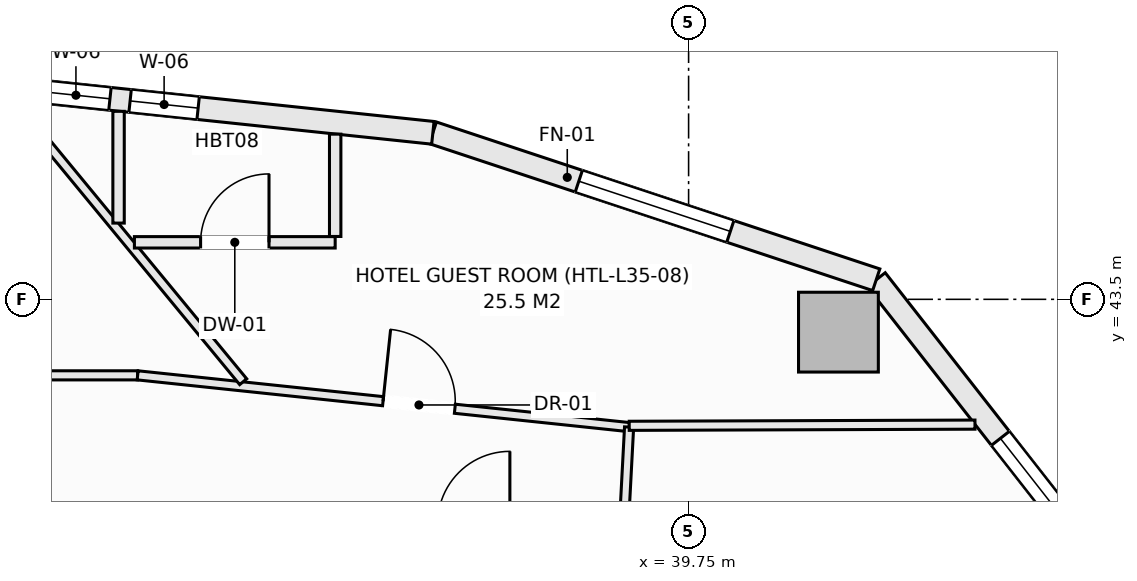
"""IFC4 building model, lengths in metres.
Left out: names, types, materials, properties, quantities, classifications, styles, units other than length and angle.
Written with IfcOpenShell. Run it as: python <this file> out.ifc"""

import sys

from ifc_helpers import new_model, si_unit, direction, frame, frame_2d, origin, origin_2d, place, context, subcontext, project, spatial, rectangle, extrude, element, fill, save


model = new_model("IFC4")
c1 = context("Model", 3, precision=1e-05, world=origin(), true_north=direction((0.0, 1.0)))
c2 = subcontext(c1, "Body", "Model", "MODEL_VIEW")
j1 = project(units=[si_unit("LENGTHUNIT", "METRE"), si_unit("PLANEANGLEUNIT", "RADIAN")], contexts=[c1])
p1 = place(None, origin())
s1 = spatial("IfcSite", under=j1, at=p1, CompositionType="ELEMENT")
p2 = place(p1, origin())
s2 = spatial("IfcBuilding", under=s1, at=p2, CompositionType="ELEMENT")
p3 = place(p2, frame((0.0, 0.0, 139.3)))
s3 = spatial("IfcBuildingStorey", under=s2, at=p3, CompositionType="ELEMENT", Elevation=139.3)
p4 = place(p3, frame((41.721, 43.068, -0.27), z_axis=(0.0, 0.0, 1.0), x_axis=(1.0, 0.0, 0.0)))
e1 = element("IfcColumn", 1, at=p4, inside=s3, PredefinedType="COLUMN", context=c2, shape_type="SweptSolid", body=[
    extrude(rectangle(XDim=1.05, YDim=1.05, at=origin_2d()), origin(), (0.0, 0.0, 1.0), 3.4),
])
p5 = place(p3, frame((42.219, 43.758, 0.0), z_axis=(0.0, 0.0, 1.0), x_axis=(0.616435134162, -0.787405693001, 0.0)))
e2 = element("IfcWall", 2, at=p5, inside=s3, PredefinedType="SOLIDWALL", context=c2, shape_type="SweptSolid", body=[
    extrude(rectangle(XDim=5.759, YDim=0.3, at=frame_2d((2.879, 0.0))), origin(), (0.0, 0.0, 1.0), 2.653),
])
p6 = place(p5, frame((2.65, 0.0, 0.74)))
e3 = element("IfcOpeningElement", 3, at=p6, cuts=e2, PredefinedType="OPENING", context=c2, shape_type="SweptSolid", body=[
    extrude(rectangle(XDim=2.1, YDim=1.7, at=frame_2d((1.05, 0.85))), frame((0.0, 0.16, 0.0), z_axis=(0.0, -1.0, 0.0), x_axis=(1.0, 0.0, 0.0)), (0.0, 0.0, 1.0), 0.32),
])
p7 = place(p3, frame((36.385, 45.691, 0.0), z_axis=(0.0, 0.0, 1.0), x_axis=(0.949238009374, -0.314558741032, 0.0)))
e4 = element("IfcWall", 4, at=p7, inside=s3, PredefinedType="SOLIDWALL", context=c2, shape_type="SweptSolid", body=[
    extrude(rectangle(XDim=6.146, YDim=0.3, at=frame_2d((3.073, 0.0))), origin(), (0.0, 0.0, 1.0), 2.653),
])
p8 = place(p7, frame((2.023, 0.0, 0.74)))
e5 = element("IfcOpeningElement", 5, at=p8, cuts=e4, PredefinedType="OPENING", context=c2, shape_type="SweptSolid", body=[
    extrude(rectangle(XDim=2.1, YDim=1.7, at=frame_2d((1.05, 0.85))), frame((0.0, 0.16, 0.0), z_axis=(0.0, -1.0, 0.0), x_axis=(1.0, 0.0, 0.0)), (0.0, 0.0, 1.0), 0.32),
])
p9 = place(p3, frame((30.125, 46.35, 0.0), z_axis=(0.0, 0.0, 1.0), x_axis=(0.994498012394, -0.104755445421, 0.0)))
e6 = element("IfcWall", 6, at=p9, inside=s3, PredefinedType="SOLIDWALL", context=c2, shape_type="SweptSolid", body=[
    extrude(rectangle(XDim=6.295, YDim=0.3, at=frame_2d((3.147, 0.0))), origin(), (0.0, 0.0, 1.0), 2.653),
])
p10 = place(p9, frame((1.123, 0.0, 0.74)))
e7 = element("IfcOpeningElement", 7, at=p10, cuts=e6, PredefinedType="OPENING", context=c2, shape_type="SweptSolid", body=[
    extrude(rectangle(XDim=0.9, YDim=1.7, at=frame_2d((0.45, 0.85))), frame((0.0, 0.16, 0.0), z_axis=(0.0, -1.0, 0.0), x_axis=(1.0, 0.0, 0.0)), (0.0, 0.0, 1.0), 0.32),
])
p11 = place(p9, frame((2.289, 0.0, 0.74)))
e8 = element("IfcOpeningElement", 8, at=p11, cuts=e6, PredefinedType="OPENING", context=c2, shape_type="SweptSolid", body=[
    extrude(rectangle(XDim=0.9, YDim=1.7, at=frame_2d((0.45, 0.85))), frame((0.0, 0.16, 0.0), z_axis=(0.0, -1.0, 0.0), x_axis=(1.0, 0.0, 0.0)), (0.0, 0.0, 1.0), 0.32),
])
p12 = place(p3, frame((27.749, 42.5, 0.0), z_axis=(0.0, 0.0, 1.0), x_axis=(1.0, 0.0, 0.0)))
e9 = element("IfcWall", 9, at=p12, inside=s3, PredefinedType="PARTITIONING", context=c2, shape_type="SweptSolid", body=[
    extrude(rectangle(XDim=4.752, YDim=0.12, at=frame_2d((2.376, 0.0))), origin(), (0.0, 0.0, 1.0), 3.13),
])
p13 = place(p3, frame((32.501, 42.5, 0.0), z_axis=(0.0, 0.0, 1.0), x_axis=(0.994501131299, -0.104725831799, 0.0)))
e10 = element("IfcWall", 10, at=p13, inside=s3, PredefinedType="PARTITIONING", context=c2, shape_type="SweptSolid", body=[
    extrude(rectangle(XDim=6.502, YDim=0.12, at=frame_2d((3.251, 0.0))), origin(), (0.0, 0.0, 1.0), 3.13),
])
p14 = place(p13, frame((3.247, 0.0, 0.0)))
e11 = element("IfcOpeningElement", 11, at=p14, cuts=e10, PredefinedType="OPENING", context=c2, shape_type="SweptSolid", body=[
    extrude(rectangle(XDim=0.95, YDim=2.1, at=frame_2d((0.475, 1.05))), frame((0.0, 0.07, 0.0), z_axis=(0.0, -1.0, 0.0), x_axis=(1.0, 0.0, 0.0)), (0.0, 0.0, 1.0), 0.14),
])
p15 = place(p3, frame((38.9, 40.55, 0.0), z_axis=(0.0, 0.0, 1.0), x_axis=(0.052831079727, 0.99860346335, 0.0)))
e12 = element("IfcWall", 12, at=p15, inside=s3, PredefinedType="PARTITIONING", context=c2, shape_type="SweptSolid", body=[
    extrude(rectangle(XDim=1.271, YDim=0.12, at=frame_2d((0.635, 0.0))), origin(), (0.0, 0.0, 1.0), 3.13),
])
p16 = place(p3, frame((30.835, 46.122, 0.0), z_axis=(0.0, 0.0, 1.0), x_axis=(0.636070633964, -0.771630836999, 0.0)))
e13 = element("IfcWall", 13, at=p16, inside=s3, PredefinedType="PARTITIONING", context=c2, shape_type="SweptSolid", body=[
    extrude(rectangle(XDim=4.803, YDim=0.12, at=frame_2d((2.402, 0.0))), origin(), (0.0, 0.0, 1.0), 2.653),
])
p17 = place(p3, frame((38.969, 41.836, 0.0), z_axis=(0.0, 0.0, 1.0), x_axis=(0.999993915468, 0.003488413272, 0.0)))
e14 = element("IfcWall", 14, at=p17, inside=s3, PredefinedType="PARTITIONING", context=c2, shape_type="SweptSolid", body=[
    extrude(rectangle(XDim=4.549, YDim=0.12, at=frame_2d((2.274, 0.0))), origin(), (0.0, 0.0, 1.0), 2.653),
])
p18 = place(p3, frame((32.458, 44.25, 0.0), z_axis=(0.0, 0.0, 1.0), x_axis=(1.0, 0.0, 0.0)))
e15 = element("IfcWall", 15, at=p18, inside=s3, PredefinedType="PARTITIONING", context=c2, shape_type="SweptSolid", body=[
    extrude(rectangle(XDim=2.642, YDim=0.15, at=frame_2d((1.321, 0.0))), origin(), (0.0, 0.0, 1.0), 3.13),
])
p19 = place(p18, frame((0.871, 0.0, 0.0)))
e16 = element("IfcOpeningElement", 16, at=p19, cuts=e15, PredefinedType="OPENING", context=c2, shape_type="SweptSolid", body=[
    extrude(rectangle(XDim=0.9, YDim=2.1, at=frame_2d((0.45, 1.05))), frame((0.0, 0.085, 0.0), z_axis=(0.0, -1.0, 0.0), x_axis=(1.0, 0.0, 0.0)), (0.0, 0.0, 1.0), 0.17),
])
p20 = place(p3, frame((35.1, 44.327, 0.0), z_axis=(0.0, 0.0, 1.0), x_axis=(0.0, 1.0, 0.0)))
e17 = element("IfcWall", 17, at=p20, inside=s3, PredefinedType="PARTITIONING", context=c2, shape_type="SweptSolid", body=[
    extrude(rectangle(XDim=1.346, YDim=0.15, at=frame_2d((0.673, 0.0))), origin(), (0.0, 0.0, 1.0), 3.13),
])
p21 = place(p3, frame((32.25, 44.503, 0.0), z_axis=(0.0, 0.0, 1.0), x_axis=(0.0, 1.0, 0.0)))
e18 = element("IfcWall", 18, at=p21, inside=s3, PredefinedType="PARTITIONING", context=c2, shape_type="SweptSolid", body=[
    extrude(rectangle(XDim=1.47, YDim=0.15, at=frame_2d((0.735, 0.0))), origin(), (0.0, 0.0, 1.0), 3.13),
])
p22 = place(p6, origin())
e19 = element("IfcWindow", 19, at=p22, inside=s3, PartitioningType="SINGLE_PANEL", PredefinedType="WINDOW", context=c2, shape_type="SweptSolid", body=[
    extrude(rectangle(XDim=2.1, YDim=1.7, at=frame_2d((1.05, 0.85))), frame((0.0, 0.03, 0.0), z_axis=(0.0, -1.0, 0.0), x_axis=(1.0, 0.0, 0.0)), (0.0, 0.0, 1.0), 0.06),
])
fill(e3, e19)
p23 = place(p8, origin())
e20 = element("IfcWindow", 20, at=p23, inside=s3, PartitioningType="SINGLE_PANEL", PredefinedType="WINDOW", context=c2, shape_type="SweptSolid", body=[
    extrude(rectangle(XDim=2.1, YDim=1.7, at=frame_2d((1.05, 0.85))), frame((0.0, 0.03, 0.0), z_axis=(0.0, -1.0, 0.0), x_axis=(1.0, 0.0, 0.0)), (0.0, 0.0, 1.0), 0.06),
])
fill(e5, e20)
p24 = place(p10, origin())
e21 = element("IfcWindow", 21, at=p24, inside=s3, PartitioningType="SINGLE_PANEL", PredefinedType="WINDOW", context=c2, shape_type="SweptSolid", body=[
    extrude(rectangle(XDim=0.9, YDim=1.7, at=frame_2d((0.45, 0.85))), frame((0.0, 0.03, 0.0), z_axis=(0.0, -1.0, 0.0), x_axis=(1.0, 0.0, 0.0)), (0.0, 0.0, 1.0), 0.06),
])
fill(e7, e21)
p25 = place(p14, origin())
e22 = element("IfcDoor", 22, at=p25, inside=s3, OperationType="SINGLE_SWING_LEFT", PredefinedType="DOOR", context=c2, shape_type="SweptSolid", body=[
    extrude(rectangle(XDim=0.95, YDim=2.1, at=frame_2d((0.475, 1.05))), frame((0.0, 0.025, 0.0), z_axis=(0.0, -1.0, 0.0), x_axis=(1.0, 0.0, 0.0)), (0.0, 0.0, 1.0), 0.05),
])
fill(e11, e22)
p26 = place(p19, origin())
e23 = element("IfcDoor", 23, at=p26, inside=s3, OperationType="SINGLE_SWING_RIGHT", PredefinedType="DOOR", context=c2, shape_type="SweptSolid", body=[
    extrude(rectangle(XDim=0.9, YDim=2.1, at=frame_2d((0.45, 1.05))), frame((0.0, 0.025, 0.0), z_axis=(0.0, -1.0, 0.0), x_axis=(1.0, 0.0, 0.0)), (0.0, 0.0, 1.0), 0.05),
])
fill(e16, e23)
p27 = place(p11, origin())
e24 = element("IfcWindow", 24, at=p27, inside=s3, PartitioningType="SINGLE_PANEL", PredefinedType="WINDOW", context=c2, shape_type="SweptSolid", body=[
    extrude(rectangle(XDim=0.9, YDim=1.7, at=frame_2d((0.45, 0.85))), frame((0.0, 0.03, 0.0), z_axis=(0.0, -1.0, 0.0), x_axis=(1.0, 0.0, 0.0)), (0.0, 0.0, 1.0), 0.06),
])
fill(e8, e24)
save(model, sys.argv[1])
